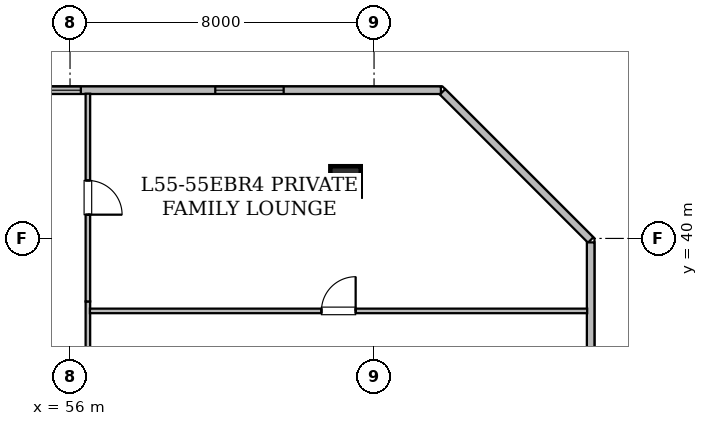
"""IFC4 building model, lengths in metres.
Left out: names, types, materials, properties, quantities, classifications, styles, units other than length and angle.
Written with IfcOpenShell. Run it as: python <this file> out.ifc"""

import sys

from ifc_helpers import new_model, si_unit, direction, frame, frame_2d, origin, origin_2d, place, context, subcontext, project, spatial, rectangle, hollow_rectangle, extrude, element, fill, save


model = new_model("IFC4")
c1 = context("Model", 3, precision=1e-05, world=origin(), true_north=direction((0.0, 1.0)))
c2 = subcontext(c1, "Body", "Model", "MODEL_VIEW")
j1 = project(units=[si_unit("LENGTHUNIT", "METRE"), si_unit("PLANEANGLEUNIT", "RADIAN")], contexts=[c1])
p1 = place(None, origin())
s1 = spatial("IfcSite", under=j1, at=p1, CompositionType="ELEMENT")
p2 = place(p1, origin())
s2 = spatial("IfcBuilding", under=s1, at=p2, CompositionType="ELEMENT")
p3 = place(p2, frame((0.0, 0.0, 217.2)))
s3 = spatial("IfcBuildingStorey", under=s2, at=p3, CompositionType="ELEMENT", Elevation=217.2)
p4 = place(p3, frame((63.25, 41.5, 0.025), z_axis=(0.0, 0.0, 1.0), x_axis=(1.0, 0.0, 0.0)))
e1 = element("IfcColumn", 1, at=p4, inside=s3, PredefinedType="COLUMN", context=c2, shape_type="SweptSolid", body=[
    extrude(hollow_rectangle(XDim=0.8, YDim=0.8, WallThickness=0.04, at=origin_2d()), origin(), (0.0, 0.0, 1.0), 3.625),
])
p5 = place(p3, frame((24.302, 43.9, 0.0), z_axis=(0.0, 0.0, 1.0), x_axis=(1.0, 0.0, 0.0)))
e2 = element("IfcWall", 2, at=p5, inside=s3, PredefinedType="STANDARD", context=c2, shape_type="SweptSolid", body=[
    extrude(rectangle(XDim=41.457, YDim=0.2, at=frame_2d((20.729, 0.0))), origin(), (0.0, 0.0, 1.0), 3.43),
])
p6 = place(p5, frame((0.509, 0.0, 0.85)))
e3 = element("IfcOpeningElement", 3, at=p6, cuts=e2, PredefinedType="OPENING", context=c2, shape_type="SweptSolid", body=[
    extrude(rectangle(XDim=1.8, YDim=0.92, at=frame_2d((0.9, 0.46))), frame((0.0, 0.11, 0.0), z_axis=(0.0, -1.0, 0.0), x_axis=(1.0, 0.0, 0.0)), (0.0, 0.0, 1.0), 0.22),
])
p7 = place(p5, frame((9.023, 0.0, 0.85)))
e4 = element("IfcOpeningElement", 4, at=p7, cuts=e2, PredefinedType="OPENING", context=c2, shape_type="SweptSolid", body=[
    extrude(rectangle(XDim=1.8, YDim=0.92, at=frame_2d((0.9, 0.46))), frame((0.0, 0.11, 0.0), z_axis=(0.0, -1.0, 0.0), x_axis=(1.0, 0.0, 0.0)), (0.0, 0.0, 1.0), 0.22),
])
p8 = place(p5, frame((14.33, 0.0, 0.85)))
e5 = element("IfcOpeningElement", 5, at=p8, cuts=e2, PredefinedType="OPENING", context=c2, shape_type="SweptSolid", body=[
    extrude(rectangle(XDim=1.8, YDim=0.92, at=frame_2d((0.9, 0.46))), frame((0.0, 0.11, 0.0), z_axis=(0.0, -1.0, 0.0), x_axis=(1.0, 0.0, 0.0)), (0.0, 0.0, 1.0), 0.22),
])
p9 = place(p5, frame((30.783, 0.0, 0.78)))
e6 = element("IfcOpeningElement", 6, at=p9, cuts=e2, PredefinedType="OPENING", context=c2, shape_type="SweptSolid", body=[
    extrude(rectangle(XDim=1.2, YDim=1.5, at=frame_2d((0.6, 0.75))), frame((0.0, 0.11, 0.0), z_axis=(0.0, -1.0, 0.0), x_axis=(1.0, 0.0, 0.0)), (0.0, 0.0, 1.0), 0.22),
])
p10 = place(p5, frame((23.056, 0.0, 0.85)))
e7 = element("IfcOpeningElement", 7, at=p10, cuts=e2, PredefinedType="OPENING", context=c2, shape_type="SweptSolid", body=[
    extrude(rectangle(XDim=1.8, YDim=0.92, at=frame_2d((0.9, 0.46))), frame((0.0, 0.11, 0.0), z_axis=(0.0, -1.0, 0.0), x_axis=(1.0, 0.0, 0.0)), (0.0, 0.0, 1.0), 0.22),
])
p11 = place(p5, frame((35.52, 0.0, 0.85)))
e8 = element("IfcOpeningElement", 8, at=p11, cuts=e2, PredefinedType="OPENING", context=c2, shape_type="SweptSolid", body=[
    extrude(rectangle(XDim=1.8, YDim=0.92, at=frame_2d((0.9, 0.46))), frame((0.0, 0.11, 0.0), z_axis=(0.0, -1.0, 0.0), x_axis=(1.0, 0.0, 0.0)), (0.0, 0.0, 1.0), 0.22),
])
p12 = place(p3, frame((65.802, 43.857, 0.0), z_axis=(0.0, 0.0, 1.0), x_axis=(0.707106781187, -0.707106781187, 0.0)))
e9 = element("IfcWall", 9, at=p12, inside=s3, PredefinedType="STANDARD", context=c2, shape_type="SweptSolid", body=[
    extrude(rectangle(XDim=5.512, YDim=0.2, at=frame_2d((2.756, 0.0))), origin(), (0.0, 0.0, 1.0), 3.43),
])
p13 = place(p3, frame((69.7, 39.896, 0.0), z_axis=(0.0, 0.0, 1.0), x_axis=(0.0, -1.0, 0.0)))
e10 = element("IfcWall", 10, at=p13, inside=s3, PredefinedType="STANDARD", context=c2, shape_type="SweptSolid", body=[
    extrude(rectangle(XDim=8.863, YDim=0.2, at=frame_2d((4.432, 0.0))), origin(), (0.0, 0.0, 1.0), 3.43),
])
p14 = place(p13, frame((3.392, 0.0, 0.85)))
e11 = element("IfcOpeningElement", 11, at=p14, cuts=e10, PredefinedType="OPENING", context=c2, shape_type="SweptSolid", body=[
    extrude(rectangle(XDim=1.8, YDim=0.92, at=frame_2d((0.9, 0.46))), frame((0.0, 0.11, 0.0), z_axis=(0.0, -1.0, 0.0), x_axis=(1.0, 0.0, 0.0)), (0.0, 0.0, 1.0), 0.22),
])
p15 = place(p3, frame((56.47, 38.342, 0.0), z_axis=(0.0, 0.0, 1.0), x_axis=(0.0, -1.0, 0.0)))
e12 = element("IfcWall", 12, at=p15, inside=s3, PredefinedType="PARTITIONING", context=c2, shape_type="SweptSolid", body=[
    extrude(rectangle(XDim=5.291, YDim=0.12, at=frame_2d((2.646, 0.0))), origin(), (0.0, 0.0, 1.0), 2.725),
])
p16 = place(p3, frame((56.47, 43.808, 0.0), z_axis=(0.0, 0.0, 1.0), x_axis=(0.0, -1.0, 0.0)))
e13 = element("IfcWall", 13, at=p16, inside=s3, PredefinedType="PARTITIONING", context=c2, shape_type="SweptSolid", body=[
    extrude(rectangle(XDim=5.466, YDim=0.12, at=frame_2d((2.733, 0.0))), origin(), (0.0, 0.0, 1.0), 2.725),
])
p17 = place(p16, frame((2.283, 0.0, 0.0)))
e14 = element("IfcOpeningElement", 14, at=p17, cuts=e13, PredefinedType="OPENING", context=c2, shape_type="SweptSolid", body=[
    extrude(rectangle(XDim=0.9, YDim=2.1, at=frame_2d((0.45, 1.05))), frame((0.0, 0.07, 0.0), z_axis=(0.0, -1.0, 0.0), x_axis=(1.0, 0.0, 0.0)), (0.0, 0.0, 1.0), 0.14),
])
p18 = place(p3, frame((56.524, 38.093, 0.0), z_axis=(0.0, 0.0, 1.0), x_axis=(1.0, 0.0, 0.0)))
e15 = element("IfcWall", 15, at=p18, inside=s3, PredefinedType="PARTITIONING", context=c2, shape_type="SweptSolid", body=[
    extrude(rectangle(XDim=13.084, YDim=0.12, at=frame_2d((6.542, 0.0))), origin(), (0.0, 0.0, 1.0), 2.887),
])
p19 = place(p18, frame((6.092, 0.0, 0.0)))
e16 = element("IfcOpeningElement", 16, at=p19, cuts=e15, PredefinedType="OPENING", context=c2, shape_type="SweptSolid", body=[
    extrude(rectangle(XDim=0.9, YDim=2.1, at=frame_2d((0.45, 1.05))), frame((0.0, 0.07, 0.0), z_axis=(0.0, -1.0, 0.0), x_axis=(1.0, 0.0, 0.0)), (0.0, 0.0, 1.0), 0.14),
])
p20 = place(p9, origin())
e17 = element("IfcWindow", 17, at=p20, inside=s3, PartitioningType="SINGLE_PANEL", PredefinedType="WINDOW", context=c2, shape_type="SweptSolid", body=[
    extrude(rectangle(XDim=1.2, YDim=1.5, at=frame_2d((0.6, 0.75))), frame((0.0, 0.03, 0.0), z_axis=(0.0, -1.0, 0.0), x_axis=(1.0, 0.0, 0.0)), (0.0, 0.0, 1.0), 0.06),
])
fill(e6, e17)
p21 = place(p11, origin())
e18 = element("IfcWindow", 18, at=p21, inside=s3, PartitioningType="SINGLE_PANEL", PredefinedType="WINDOW", context=c2, shape_type="SweptSolid", body=[
    extrude(rectangle(XDim=1.8, YDim=0.92, at=frame_2d((0.9, 0.46))), frame((0.0, 0.03, 0.0), z_axis=(0.0, -1.0, 0.0), x_axis=(1.0, 0.0, 0.0)), (0.0, 0.0, 1.0), 0.06),
])
fill(e8, e18)
p22 = place(p17, origin())
e19 = element("IfcDoor", 19, at=p22, inside=s3, OperationType="SINGLE_SWING_RIGHT", PredefinedType="DOOR", context=c2, shape_type="SweptSolid", body=[
    extrude(rectangle(XDim=0.9, YDim=2.1, at=frame_2d((0.45, 1.05))), frame((0.0, 0.025, 0.0), z_axis=(0.0, -1.0, 0.0), x_axis=(1.0, 0.0, 0.0)), (0.0, 0.0, 1.0), 0.05),
])
fill(e14, e19)
p23 = place(p19, origin())
e20 = element("IfcDoor", 20, at=p23, inside=s3, OperationType="SINGLE_SWING_RIGHT", PredefinedType="DOOR", context=c2, shape_type="SweptSolid", body=[
    extrude(rectangle(XDim=0.9, YDim=2.1, at=frame_2d((0.45, 1.05))), frame((0.0, 0.025, 0.0), z_axis=(0.0, -1.0, 0.0), x_axis=(1.0, 0.0, 0.0)), (0.0, 0.0, 1.0), 0.05),
])
fill(e16, e20)
save(model, sys.argv[1])
